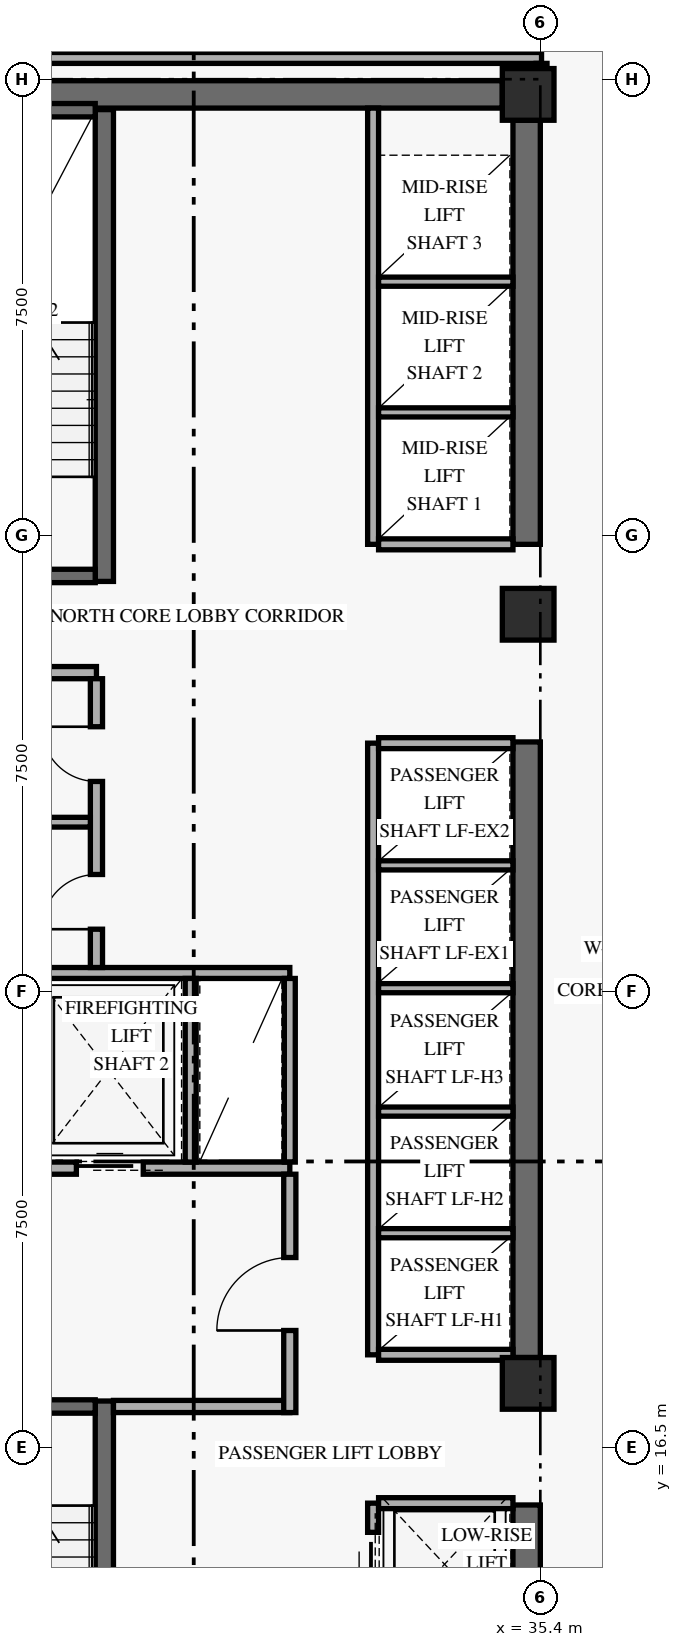
"""IFC4 building model, lengths in metres.
Left out: names, types, materials, properties, quantities, classifications, styles, units other than length and angle.
Written with IfcOpenShell. Run it as: python <this file> out.ifc"""

import sys

from ifc_helpers import new_model, si_unit, direction, frame, frame_2d, origin, origin_2d, place, context, subcontext, project, spatial, rectangle, extrude, element, fill, save


model = new_model("IFC4")
c1 = context("Model", 3, precision=1e-05, world=origin(), true_north=direction((0.0, 1.0)))
c2 = subcontext(c1, "Body", "Model", "MODEL_VIEW")
j1 = project(units=[si_unit("LENGTHUNIT", "METRE"), si_unit("PLANEANGLEUNIT", "RADIAN")], contexts=[c1])
p1 = place(None, origin())
s1 = spatial("IfcSite", under=j1, at=p1, CompositionType="ELEMENT")
p2 = place(p1, origin())
s2 = spatial("IfcBuilding", under=s1, at=p2, CompositionType="ELEMENT")
p3 = place(p2, frame((0.0, 0.0, 38.4)))
s3 = spatial("IfcBuildingStorey", under=s2, at=p3, CompositionType="ELEMENT", Elevation=38.4)
p4 = place(p3, frame((35.175, 9.675, 0.0), z_axis=(0.0, 0.0, 1.0), x_axis=(0.0, 1.0, 0.0)))
e1 = element("IfcWall", 1, at=p4, inside=s3, PredefinedType="SHEAR", context=c2, shape_type="SweptSolid", body=[
    extrude(rectangle(XDim=5.875, YDim=0.45, at=frame_2d((2.938, 0.0))), origin(), (0.0, 0.0, 1.0), 2.667),
])
p5 = place(p3, frame((35.175, 17.975, 0.0), z_axis=(0.0, 0.0, 1.0), x_axis=(0.0, 1.0, 0.0)))
e2 = element("IfcWall", 2, at=p5, inside=s3, PredefinedType="SHEAR", context=c2, shape_type="SweptSolid", body=[
    extrude(rectangle(XDim=10.125, YDim=0.45, at=frame_2d((5.062, 0.0))), origin(), (0.0, 0.0, 1.0), 2.667),
])
p6 = place(p3, frame((35.175, 31.35, 0.0), z_axis=(0.0, 0.0, 1.0), x_axis=(0.0, 1.0, 0.0)))
e3 = element("IfcWall", 3, at=p6, inside=s3, PredefinedType="SHEAR", context=c2, shape_type="SweptSolid", body=[
    extrude(rectangle(XDim=6.975, YDim=0.45, at=frame_2d((3.487, 0.0))), origin(), (0.0, 0.0, 1.0), 2.667),
])
p7 = place(p3, frame((24.625, 38.75, 0.0), z_axis=(0.0, 0.0, 1.0), x_axis=(1.0, 0.0, 0.0)))
e4 = element("IfcWall", 4, at=p7, inside=s3, PredefinedType="SHEAR", context=c2, shape_type="SweptSolid", body=[
    extrude(rectangle(XDim=10.15, YDim=0.45, at=frame_2d((5.075, 0.0))), origin(), (0.0, 0.0, 1.0), 3.36),
])
p8 = place(p3, frame((28.23, 9.5, 0.0), z_axis=(0.0, 0.0, 1.0), x_axis=(0.0, 1.0, 0.0)))
e5 = element("IfcWall", 5, at=p8, inside=s3, PredefinedType="SHEAR", context=c2, shape_type="SweptSolid", body=[
    extrude(rectangle(XDim=7.76, YDim=0.3, at=frame_2d((3.88, 0.0))), origin(), (0.0, 0.0, 1.0), 3.36),
])
p9 = place(p3, frame((24.92, 17.17, 0.0), z_axis=(0.0, 0.0, 1.0), x_axis=(1.0, 0.0, 0.0)))
e6 = element("IfcWall", 6, at=p9, inside=s3, PredefinedType="SHEAR", context=c2, shape_type="SweptSolid", body=[
    extrude(rectangle(XDim=3.16, YDim=0.22, at=frame_2d((1.58, 0.0))), origin(), (0.0, 0.0, 1.0), 3.36),
])
p10 = place(p9, frame((0.78, 0.0, 0.0)))
e7 = element("IfcOpeningElement", 7, at=p10, cuts=e6, PredefinedType="OPENING", context=c2, shape_type="SweptSolid", body=[
    extrude(rectangle(XDim=1.05, YDim=2.15, at=frame_2d((0.525, 1.075))), frame((0.0, 0.12, 0.0), z_axis=(0.0, -1.0, 0.0), x_axis=(1.0, 0.0, 0.0)), (0.0, 0.0, 1.0), 0.24),
])
p11 = place(p3, frame((28.23, 30.74, 0.0), z_axis=(0.0, 0.0, 1.0), x_axis=(0.0, 1.0, 0.0)))
e8 = element("IfcWall", 8, at=p11, inside=s3, PredefinedType="SHEAR", context=c2, shape_type="SweptSolid", body=[
    extrude(rectangle(XDim=7.76, YDim=0.3, at=frame_2d((3.88, 0.0))), origin(), (0.0, 0.0, 1.0), 3.36),
])
p12 = place(p3, frame((24.92, 30.83, 0.0), z_axis=(0.0, 0.0, 1.0), x_axis=(1.0, 0.0, 0.0)))
e9 = element("IfcWall", 9, at=p12, inside=s3, PredefinedType="SHEAR", context=c2, shape_type="SweptSolid", body=[
    extrude(rectangle(XDim=3.16, YDim=0.22, at=frame_2d((1.58, 0.0))), origin(), (0.0, 0.0, 1.0), 3.36),
])
p13 = place(p12, frame((0.78, 0.0, 0.0)))
e10 = element("IfcOpeningElement", 10, at=p13, cuts=e9, PredefinedType="OPENING", context=c2, shape_type="SweptSolid", body=[
    extrude(rectangle(XDim=1.05, YDim=2.15, at=frame_2d((0.525, 1.075))), frame((0.0, 0.12, 0.0), z_axis=(0.0, -1.0, 0.0), x_axis=(1.0, 0.0, 0.0)), (0.0, 0.0, 1.0), 0.24),
])
p14 = place(p3, frame((24.92, 38.49, 0.0), z_axis=(0.0, 0.0, 1.0), x_axis=(1.0, 0.0, 0.0)))
e11 = element("IfcWall", 11, at=p14, inside=s3, PredefinedType="SHEAR", context=c2, shape_type="SweptSolid", body=[
    extrude(rectangle(XDim=3.16, YDim=0.22, at=frame_2d((1.58, 0.0))), origin(), (0.0, 0.0, 1.0), 3.36),
])
for number, where, z_axis, x_axis in (
    (12, (35.2, 17.55, 0.0), (0.0, 0.0, 1.0), (1.0, 0.0, 0.0)),
    (13, (35.2, 30.2, 0.0), (0.0, 0.0, 1.0), (1.0, 0.0, 0.0)),
    (14, (35.2, 38.75, 0.0), (0.0, 0.0, 1.0), (1.0, 0.0, 0.0)),
):
    element("IfcColumn", number, at=place(p3, frame(where, z_axis=z_axis, x_axis=x_axis)), inside=s3, PredefinedType="COLUMN", context=c2, shape_type="SweptSolid", body=[
        extrude(rectangle(XDim=0.85, YDim=0.85, at=origin_2d()), origin(), (0.0, 0.0, 1.0), 3.6),
    ])
p15 = place(p3, frame((24.45, 21.09, 0.0), z_axis=(0.0, 0.0, 1.0), x_axis=(1.0, 0.0, 0.0)))
e15 = element("IfcWall", 15, at=p15, inside=s3, PredefinedType="STANDARD", context=c2, shape_type="SweptSolid", body=[
    extrude(rectangle(XDim=6.83, YDim=0.2, at=frame_2d((3.415, 0.0))), origin(), (0.0, 0.0, 1.0), 3.36),
])
p16 = place(p15, frame((0.72, 0.0, 0.0)))
e16 = element("IfcOpeningElement", 16, at=p16, cuts=e15, PredefinedType="OPENING", context=c2, shape_type="SweptSolid", body=[
    extrude(rectangle(XDim=1.1, YDim=2.2, at=frame_2d((0.55, 1.1))), frame((0.0, 0.11, 0.0), z_axis=(0.0, -1.0, 0.0), x_axis=(1.0, 0.0, 0.0)), (0.0, 0.0, 1.0), 0.22),
])
p17 = place(p15, frame((3.32, 0.0, 0.0)))
e17 = element("IfcOpeningElement", 17, at=p17, cuts=e15, PredefinedType="OPENING", context=c2, shape_type="SweptSolid", body=[
    extrude(rectangle(XDim=1.1, YDim=2.2, at=frame_2d((0.55, 1.1))), frame((0.0, 0.11, 0.0), z_axis=(0.0, -1.0, 0.0), x_axis=(1.0, 0.0, 0.0)), (0.0, 0.0, 1.0), 0.22),
])
p18 = place(p3, frame((28.38, 17.17, 0.0), z_axis=(0.0, 0.0, 1.0), x_axis=(1.0, 0.0, 0.0)))
e18 = element("IfcWall", 18, at=p18, inside=s3, PredefinedType="STANDARD", context=c2, shape_type="SweptSolid", body=[
    extrude(rectangle(XDim=2.9, YDim=0.2, at=frame_2d((1.45, 0.0))), origin(), (0.0, 0.0, 1.0), 3.36),
])
p19 = place(p3, frame((31.28, 17.07, 0.0), z_axis=(0.0, 0.0, 1.0), x_axis=(0.0, 1.0, 0.0)))
e19 = element("IfcWall", 19, at=p19, inside=s3, PredefinedType="STANDARD", context=c2, shape_type="SweptSolid", body=[
    extrude(rectangle(XDim=3.92, YDim=0.2, at=frame_2d((1.96, 0.0))), origin(), (0.0, 0.0, 1.0), 2.649),
])
p20 = place(p19, frame((1.35, 0.0, 0.0)))
e20 = element("IfcOpeningElement", 20, at=p20, cuts=e19, PredefinedType="OPENING", context=c2, shape_type="SweptSolid", body=[
    extrude(rectangle(XDim=1.2, YDim=2.15, at=frame_2d((0.6, 1.075))), frame((0.0, 0.11, 0.0), z_axis=(0.0, -1.0, 0.0), x_axis=(1.0, 0.0, 0.0)), (0.0, 0.0, 1.0), 0.22),
])
p21 = place(p3, frame((24.45, 24.3, 0.0), z_axis=(0.0, 0.0, 1.0), x_axis=(1.0, 0.0, 0.0)))
e21 = element("IfcWall", 21, at=p21, inside=s3, PredefinedType="STANDARD", context=c2, shape_type="SweptSolid", body=[
    extrude(rectangle(XDim=6.83, YDim=0.18, at=frame_2d((3.415, 0.0))), origin(), (0.0, 0.0, 1.0), 3.36),
])
for number, where, z_axis, x_axis in (
    (22, (29.65, 21.19, 0.0), (0.0, 0.0, 1.0), (0.0, 1.0, 0.0)),
    (23, (31.28, 21.19, 0.0), (0.0, 0.0, 1.0), (0.0, 1.0, 0.0)),
):
    element("IfcWall", number, at=place(p3, frame(where, z_axis=z_axis, x_axis=x_axis)), inside=s3, PredefinedType="STANDARD", context=c2, shape_type="SweptSolid", body=[
        extrude(rectangle(XDim=3.02, YDim=0.18, at=frame_2d((1.51, 0.0))), origin(), (0.0, 0.0, 1.0), 3.36),
    ])
p22 = place(p3, frame((24.45, 29.24, 0.0), z_axis=(0.0, 0.0, 1.0), x_axis=(1.0, 0.0, 0.0)))
e24 = element("IfcWall", 24, at=p22, inside=s3, PredefinedType="STANDARD", context=c2, shape_type="SweptSolid", body=[
    extrude(rectangle(XDim=3.65, YDim=0.2, at=frame_2d((1.825, 0.0))), origin(), (0.0, 0.0, 1.0), 3.36),
])
p23 = place(p3, frame((28.1, 24.39, 0.0), z_axis=(0.0, 0.0, 1.0), x_axis=(0.0, 1.0, 0.0)))
e25 = element("IfcWall", 25, at=p23, inside=s3, PredefinedType="STANDARD", context=c2, shape_type="SweptSolid", body=[
    extrude(rectangle(XDim=4.75, YDim=0.2, at=frame_2d((2.375, 0.0))), origin(), (0.0, 0.0, 1.0), 3.36),
])
p24 = place(p23, frame((0.63, 0.0, 0.0)))
e26 = element("IfcOpeningElement", 26, at=p24, cuts=e25, PredefinedType="OPENING", context=c2, shape_type="SweptSolid", body=[
    extrude(rectangle(XDim=0.9, YDim=2.1, at=frame_2d((0.45, 1.05))), frame((0.0, 0.11, 0.0), z_axis=(0.0, -1.0, 0.0), x_axis=(1.0, 0.0, 0.0)), (0.0, 0.0, 1.0), 0.22),
])
p25 = place(p23, frame((3.06, 0.0, 0.0)))
e27 = element("IfcOpeningElement", 27, at=p25, cuts=e25, PredefinedType="OPENING", context=c2, shape_type="SweptSolid", body=[
    extrude(rectangle(XDim=0.9, YDim=2.1, at=frame_2d((0.45, 1.05))), frame((0.0, 0.11, 0.0), z_axis=(0.0, -1.0, 0.0), x_axis=(1.0, 0.0, 0.0)), (0.0, 0.0, 1.0), 0.22),
])
p26 = place(p3, frame((24.45, 26.78, 0.0), z_axis=(0.0, 0.0, 1.0), x_axis=(1.0, 0.0, 0.0)))
e28 = element("IfcWall", 28, at=p26, inside=s3, PredefinedType="PARTITIONING", context=c2, shape_type="SweptSolid", body=[
    extrude(rectangle(XDim=3.55, YDim=0.16, at=frame_2d((1.775, 0.0))), origin(), (0.0, 0.0, 1.0), 3.36),
])
p27 = place(p3, frame((32.65, 9.5, 0.0), z_axis=(0.0, 0.0, 1.0), x_axis=(0.0, 1.0, 0.0)))
e29 = element("IfcWall", 29, at=p27, inside=s3, PredefinedType="STANDARD", context=c2, shape_type="SweptSolid", body=[
    extrude(rectangle(XDim=6.08, YDim=0.18, at=frame_2d((3.04, 0.0))), origin(), (0.0, 0.0, 1.0), 3.36),
])
p28 = place(p27, frame((0.55, 0.0, 0.0)))
e30 = element("IfcOpeningElement", 30, at=p28, cuts=e29, PredefinedType="OPENING", context=c2, shape_type="SweptSolid", body=[
    extrude(rectangle(XDim=1.05, YDim=2.2, at=frame_2d((0.525, 1.1))), frame((0.0, 0.1, 0.0), z_axis=(0.0, -1.0, 0.0), x_axis=(1.0, 0.0, 0.0)), (0.0, 0.0, 1.0), 0.2),
])
p29 = place(p27, frame((2.55, 0.0, 0.0)))
e31 = element("IfcOpeningElement", 31, at=p29, cuts=e29, PredefinedType="OPENING", context=c2, shape_type="SweptSolid", body=[
    extrude(rectangle(XDim=1.05, YDim=2.2, at=frame_2d((0.525, 1.1))), frame((0.0, 0.1, 0.0), z_axis=(0.0, -1.0, 0.0), x_axis=(1.0, 0.0, 0.0)), (0.0, 0.0, 1.0), 0.2),
])
p30 = place(p27, frame((4.55, 0.0, 0.0)))
e32 = element("IfcOpeningElement", 32, at=p30, cuts=e29, PredefinedType="OPENING", context=c2, shape_type="SweptSolid", body=[
    extrude(rectangle(XDim=1.05, YDim=2.2, at=frame_2d((0.525, 1.1))), frame((0.0, 0.1, 0.0), z_axis=(0.0, -1.0, 0.0), x_axis=(1.0, 0.0, 0.0)), (0.0, 0.0, 1.0), 0.2),
])
p31 = place(p3, frame((32.74, 15.58, 0.0), z_axis=(0.0, 0.0, 1.0), x_axis=(1.0, 0.0, 0.0)))
e33 = element("IfcWall", 33, at=p31, inside=s3, PredefinedType="STANDARD", context=c2, shape_type="SweptSolid", body=[
    extrude(rectangle(XDim=2.21, YDim=0.18, at=frame_2d((1.105, 0.0))), origin(), (0.0, 0.0, 1.0), 3.36),
])
p32 = place(p3, frame((32.65, 18.02, 0.0), z_axis=(0.0, 0.0, 1.0), x_axis=(0.0, 1.0, 0.0)))
e34 = element("IfcWall", 34, at=p32, inside=s3, PredefinedType="STANDARD", context=c2, shape_type="SweptSolid", body=[
    extrude(rectangle(XDim=10.06, YDim=0.18, at=frame_2d((5.03, 0.0))), origin(), (0.0, 0.0, 1.0), 3.36),
])
for number, where, z_axis, x_axis in (
    (35, (32.74, 18.02, 0.0), (0.0, 0.0, 1.0), (1.0, 0.0, 0.0)),
    (36, (32.74, 28.08, 0.0), (0.0, 0.0, 1.0), (1.0, 0.0, 0.0)),
):
    element("IfcWall", number, at=place(p3, frame(where, z_axis=z_axis, x_axis=x_axis)), inside=s3, PredefinedType="STANDARD", context=c2, shape_type="SweptSolid", body=[
        extrude(rectangle(XDim=2.21, YDim=0.18, at=frame_2d((1.105, 0.0))), origin(), (0.0, 0.0, 1.0), 3.36),
    ])
for number, where, z_axis, x_axis in (
    (37, (32.74, 20.02, 0.0), (0.0, 0.0, 1.0), (1.0, 0.0, 0.0)),
    (38, (32.74, 22.02, 0.0), (0.0, 0.0, 1.0), (1.0, 0.0, 0.0)),
    (39, (32.74, 24.05, 0.0), (0.0, 0.0, 1.0), (1.0, 0.0, 0.0)),
    (40, (32.74, 26.07, 0.0), (0.0, 0.0, 1.0), (1.0, 0.0, 0.0)),
):
    element("IfcWall", number, at=place(p3, frame(where, z_axis=z_axis, x_axis=x_axis)), inside=s3, PredefinedType="STANDARD", context=c2, shape_type="SweptSolid", body=[
        extrude(rectangle(XDim=2.21, YDim=0.15, at=frame_2d((1.105, 0.0))), origin(), (0.0, 0.0, 1.0), 3.36),
    ])
p33 = place(p3, frame((32.65, 31.35, 0.0), z_axis=(0.0, 0.0, 1.0), x_axis=(0.0, 1.0, 0.0)))
e41 = element("IfcWall", 41, at=p33, inside=s3, PredefinedType="STANDARD", context=c2, shape_type="SweptSolid", body=[
    extrude(rectangle(XDim=7.175, YDim=0.18, at=frame_2d((3.587, 0.0))), origin(), (0.0, 0.0, 1.0), 3.36),
])
p34 = place(p3, frame((32.74, 31.35, 0.0), z_axis=(0.0, 0.0, 1.0), x_axis=(1.0, 0.0, 0.0)))
e42 = element("IfcWall", 42, at=p34, inside=s3, PredefinedType="STANDARD", context=c2, shape_type="SweptSolid", body=[
    extrude(rectangle(XDim=2.21, YDim=0.18, at=frame_2d((1.105, 0.0))), origin(), (0.0, 0.0, 1.0), 3.36),
])
for number, where, z_axis, x_axis in (
    (43, (32.74, 33.52, 0.0), (0.0, 0.0, 1.0), (1.0, 0.0, 0.0)),
    (44, (32.74, 35.67, 0.0), (0.0, 0.0, 1.0), (1.0, 0.0, 0.0)),
):
    element("IfcWall", number, at=place(p3, frame(where, z_axis=z_axis, x_axis=x_axis)), inside=s3, PredefinedType="STANDARD", context=c2, shape_type="SweptSolid", body=[
        extrude(rectangle(XDim=2.21, YDim=0.15, at=frame_2d((1.105, 0.0))), origin(), (0.0, 0.0, 1.0), 3.36),
    ])
p35 = place(p3, frame((23.75, 39.35, 0.0), z_axis=(0.0, 0.0, 1.0), x_axis=(1.0, 0.0, 0.0)))
e45 = element("IfcWall", 45, at=p35, inside=s3, PredefinedType="STANDARD", context=c2, shape_type="SweptSolid", body=[
    extrude(rectangle(XDim=11.67, YDim=0.18, at=frame_2d((5.835, 0.0))), origin(), (0.0, 0.0, 1.0), 2.649),
])
p36 = place(p3, frame((35.42, 38.75, 0.0), z_axis=(0.0, 0.0, 1.0), x_axis=(0.0, 1.0, 0.0)))
e46 = element("IfcWall", 46, at=p36, inside=s3, PredefinedType="STANDARD", context=c2, shape_type="SweptSolid", body=[
    extrude(rectangle(XDim=0.51, YDim=0.18, at=frame_2d((0.255, 0.0))), origin(), (0.0, 0.0, 1.0), 3.36),
])
p37 = place(p17, origin())
e47 = element("IfcDoor", 47, at=p37, inside=s3, OperationType="SLIDING_TO_LEFT", PredefinedType="DOOR", context=c2, shape_type="SweptSolid", body=[
    extrude(rectangle(XDim=1.1, YDim=2.2, at=frame_2d((0.55, 1.1))), frame((0.0, 0.025, 0.0), z_axis=(0.0, -1.0, 0.0), x_axis=(1.0, 0.0, 0.0)), (0.0, 0.0, 1.0), 0.05),
])
fill(e17, e47)
p38 = place(p20, origin())
e48 = element("IfcDoor", 48, at=p38, inside=s3, OperationType="SINGLE_SWING_LEFT", PredefinedType="DOOR", context=c2, shape_type="SweptSolid", body=[
    extrude(rectangle(XDim=1.2, YDim=2.15, at=frame_2d((0.6, 1.075))), frame((0.0, 0.025, 0.0), z_axis=(0.0, -1.0, 0.0), x_axis=(1.0, 0.0, 0.0)), (0.0, 0.0, 1.0), 0.05),
])
fill(e20, e48)
p39 = place(p24, origin())
e49 = element("IfcDoor", 49, at=p39, inside=s3, OperationType="SINGLE_SWING_LEFT", PredefinedType="DOOR", context=c2, shape_type="SweptSolid", body=[
    extrude(rectangle(XDim=0.9, YDim=2.1, at=frame_2d((0.45, 1.05))), frame((0.0, 0.025, 0.0), z_axis=(0.0, -1.0, 0.0), x_axis=(1.0, 0.0, 0.0)), (0.0, 0.0, 1.0), 0.05),
])
fill(e26, e49)
p40 = place(p25, origin())
e50 = element("IfcDoor", 50, at=p40, inside=s3, OperationType="SINGLE_SWING_RIGHT", PredefinedType="DOOR", context=c2, shape_type="SweptSolid", body=[
    extrude(rectangle(XDim=0.9, YDim=2.1, at=frame_2d((0.45, 1.05))), frame((0.0, 0.025, 0.0), z_axis=(0.0, -1.0, 0.0), x_axis=(1.0, 0.0, 0.0)), (0.0, 0.0, 1.0), 0.05),
])
fill(e27, e50)
p41 = place(p30, origin())
e51 = element("IfcDoor", 51, at=p41, inside=s3, OperationType="SLIDING_TO_LEFT", PredefinedType="DOOR", context=c2, shape_type="SweptSolid", body=[
    extrude(rectangle(XDim=1.05, YDim=2.2, at=frame_2d((0.525, 1.1))), frame((0.0, 0.025, 0.0), z_axis=(0.0, -1.0, 0.0), x_axis=(1.0, 0.0, 0.0)), (0.0, 0.0, 1.0), 0.05),
])
fill(e32, e51)
save(model, sys.argv[1])
